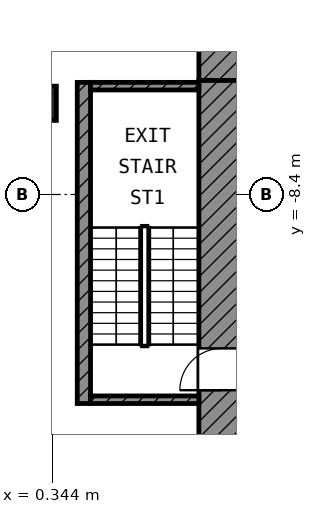
"""IFC4 building model, lengths in metres.
Left out: names, types, materials, properties, quantities, classifications, styles, units other than length and angle.
Written with IfcOpenShell. Run it as: python <this file> out.ifc"""

import sys

from ifc_helpers import new_model, si_unit, direction, frame, frame_2d, origin, origin_2d, place, context, subcontext, project, spatial, rectangle, extrude, element, fill, save


model = new_model("IFC4")
c1 = context("Model", 3, precision=1e-05, world=origin(), true_north=direction((0.0, 1.0)))
c2 = subcontext(c1, "Body", "Model", "MODEL_VIEW")
j1 = project(units=[si_unit("LENGTHUNIT", "METRE"), si_unit("PLANEANGLEUNIT", "RADIAN")], contexts=[c1])
p1 = place(None, origin())
s1 = spatial("IfcSite", under=j1, at=p1, CompositionType="ELEMENT")
p2 = place(p1, origin())
s2 = spatial("IfcBuilding", under=s1, at=p2, CompositionType="ELEMENT")
p3 = place(p2, frame((0.0, 0.0, 268.4)))
s3 = spatial("IfcBuildingStorey", under=s2, at=p3, CompositionType="ELEMENT", Elevation=268.4)
p4 = place(p3, frame((0.0, -6.0, 0.0), z_axis=(0.0, 0.0, 1.0), x_axis=(1.0, 0.0, 0.0)))
e1 = element("IfcColumn", 1, at=p4, inside=s3, PredefinedType="COLUMN", context=c2, shape_type="SweptSolid", body=[
    extrude(rectangle(XDim=0.9, YDim=0.9, at=origin_2d()), origin(), (0.0, 0.0, 1.0), 4.2),
])
p5 = place(p3, frame((4.2, -4.8, 0.0), z_axis=(0.0, 0.0, 1.0), x_axis=(1.0, 0.0, 0.0)))
e2 = element("IfcWall", 2, at=p5, inside=s3, PredefinedType="SHEAR", context=c2, shape_type="SweptSolid", body=[
    extrude(rectangle(XDim=20.6, YDim=1.2, at=frame_2d((10.3, 0.0))), origin(), (0.0, 0.0, 1.0), 3.7),
])
p6 = place(p5, frame((1.95, 0.0, 0.0)))
e3 = element("IfcOpeningElement", 3, at=p6, cuts=e2, PredefinedType="OPENING", context=c2, shape_type="SweptSolid", body=[
    extrude(rectangle(XDim=1.1, YDim=2.1, at=frame_2d((0.55, 1.05))), frame((0.0, 0.61, 0.0), z_axis=(0.0, -1.0, 0.0), x_axis=(1.0, 0.0, 0.0)), (0.0, 0.0, 1.0), 1.22),
])
p7 = place(p5, frame((17.95, 0.0, 0.0)))
e4 = element("IfcOpeningElement", 4, at=p7, cuts=e2, PredefinedType="OPENING", context=c2, shape_type="SweptSolid", body=[
    extrude(rectangle(XDim=1.1, YDim=2.1, at=frame_2d((0.55, 1.05))), frame((0.0, 0.61, 0.0), z_axis=(0.0, -1.0, 0.0), x_axis=(1.0, 0.0, 0.0)), (0.0, 0.0, 1.0), 1.22),
])
p8 = place(p3, frame((4.8, -24.8, 0.0), z_axis=(0.0, 0.0, 1.0), x_axis=(0.0, 1.0, 0.0)))
e5 = element("IfcWall", 5, at=p8, inside=s3, PredefinedType="SHEAR", context=c2, shape_type="SweptSolid", body=[
    extrude(rectangle(XDim=19.4, YDim=1.2, at=frame_2d((9.7, 0.0))), origin(), (0.0, 0.0, 1.0), 3.7),
])
p9 = place(p8, frame((11.25, 0.0, 0.0)))
e6 = element("IfcOpeningElement", 6, at=p9, cuts=e5, PredefinedType="OPENING", context=c2, shape_type="SweptSolid", body=[
    extrude(rectangle(XDim=1.1, YDim=2.1, at=frame_2d((0.55, 1.05))), frame((0.0, 0.61, 0.0), z_axis=(0.0, -1.0, 0.0), x_axis=(1.0, 0.0, 0.0)), (0.0, 0.0, 1.0), 1.22),
])
p10 = place(p8, frame((1.95, 0.0, 0.0)))
e7 = element("IfcOpeningElement", 7, at=p10, cuts=e5, PredefinedType="OPENING", context=c2, shape_type="SweptSolid", body=[
    extrude(rectangle(XDim=1.1, YDim=2.1, at=frame_2d((0.55, 1.05))), frame((0.0, 0.61, 0.0), z_axis=(0.0, -1.0, 0.0), x_axis=(1.0, 0.0, 0.0)), (0.0, 0.0, 1.0), 1.22),
])
p11 = place(p3, frame((1.175, -13.9, 0.0), z_axis=(0.0, 0.0, 1.0), x_axis=(0.0, 1.0, 0.0)))
e8 = element("IfcWall", 8, at=p11, inside=s3, PredefinedType="SHEAR", context=c2, shape_type="SweptSolid", body=[
    extrude(rectangle(XDim=8.45, YDim=0.35, at=frame_2d((4.225, 0.0))), origin(), (0.0, 0.0, 1.0), 3.7),
])
for number, where, z_axis, x_axis in (
    (9, (1.35, -5.55, 0.0), (0.0, 0.0, 1.0), (1.0, 0.0, 0.0)),
    (10, (1.35, -13.8, 0.0), (0.0, 0.0, 1.0), (1.0, 0.0, 0.0)),
):
    element("IfcWall", number, at=place(p3, frame(where, z_axis=z_axis, x_axis=x_axis)), inside=s3, PredefinedType="SHEAR", context=c2, shape_type="SweptSolid", body=[
        extrude(rectangle(XDim=2.85, YDim=0.2, at=frame_2d((1.425, 0.0))), origin(), (0.0, 0.0, 1.0), 3.7),
    ])
p12 = place(p9, origin())
e11 = element("IfcDoor", 11, at=p12, inside=s3, OperationType="SINGLE_SWING_LEFT", PredefinedType="DOOR", context=c2, shape_type="SweptSolid", body=[
    extrude(rectangle(XDim=1.1, YDim=2.1, at=frame_2d((0.55, 1.05))), frame((0.0, 0.025, 0.0), z_axis=(0.0, -1.0, 0.0), x_axis=(1.0, 0.0, 0.0)), (0.0, 0.0, 1.0), 0.05),
])
fill(e6, e11)
save(model, sys.argv[1])
